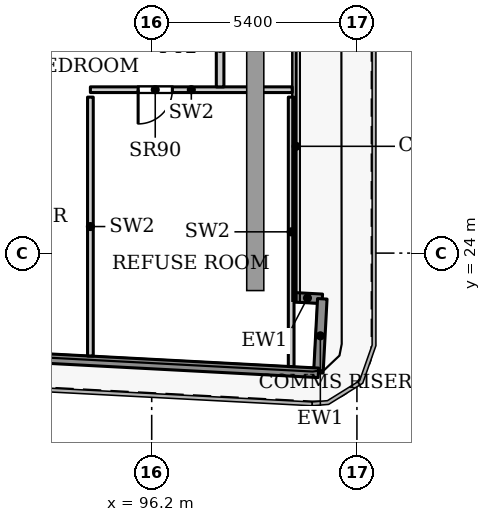
"""IFC4 building model, lengths in metres.
Left out: names, types, materials, properties, quantities, classifications, styles, units other than length and angle.
Written with IfcOpenShell. Run it as: python <this file> out.ifc"""

import sys

from ifc_helpers import new_model, si_unit, direction, frame, frame_2d, origin, place, context, subcontext, project, spatial, rectangle, extrude, source, transform, mapped, element, fill, save


model = new_model("IFC4")
c1 = context("Model", 3, precision=1e-05, world=origin(), true_north=direction((0.0, 1.0)))
c2 = subcontext(c1, "Body", "Model", "MODEL_VIEW")
j1 = project(units=[si_unit("LENGTHUNIT", "METRE"), si_unit("PLANEANGLEUNIT", "RADIAN")], contexts=[c1])
p1 = place(None, origin())
s1 = spatial("IfcSite", under=j1, at=p1, CompositionType="ELEMENT")
p2 = place(p1, origin())
s2 = spatial("IfcBuilding", under=s1, at=p2, CompositionType="ELEMENT")
p3 = place(p2, frame((0.0, 0.0, 140.9)))
s3 = spatial("IfcBuildingStorey", under=s2, at=p3, CompositionType="ELEMENT", Elevation=140.9)
p4 = place(p3, frame((99.907, 22.839, 0.0), z_axis=(0.0, 0.0, 1.0), x_axis=(0.998561284263, -0.053622398031, 0.0)))
e1 = element("IfcWall", 1, at=p4, inside=s3, PredefinedType="SOLIDWALL", context=c2, shape_type="SweptSolid", body=[
    extrude(rectangle(XDim=0.783, YDim=0.25, at=frame_2d((0.392, 0.0))), origin(), (0.0, 0.0, 1.0), 3.75),
])
p5 = place(p3, frame((100.689, 22.797, 0.0), z_axis=(0.0, 0.0, 1.0), x_axis=(-0.052841433274, -0.998602915542, 0.0)))
e2 = element("IfcWall", 2, at=p5, inside=s3, PredefinedType="SOLIDWALL", context=c2, shape_type="SweptSolid", body=[
    extrude(rectangle(XDim=1.95, YDim=0.25, at=frame_2d((0.975, 0.0))), origin(), (0.0, 0.0, 1.0), 3.75),
])
p6 = place(p3, frame((100.586, 20.85, 0.0), z_axis=(0.0, 0.0, 1.0), x_axis=(-0.99861746497, 0.052565755559, 0.0)))
e3 = element("IfcWall", 3, at=p6, inside=s3, PredefinedType="SOLIDWALL", context=c2, shape_type="SweptSolid", body=[
    extrude(rectangle(XDim=66.639, YDim=0.25, at=frame_2d((33.319, 0.0))), origin(), (0.0, 0.0, 1.0), 3.75),
])
p7 = place(p3, frame((94.587, 28.3, 0.0), z_axis=(0.0, 0.0, 1.0), x_axis=(1.0, 0.0, 0.0)))
e4 = element("IfcWall", 4, at=p7, inside=s3, PredefinedType="PARTITIONING", context=c2, shape_type="SweptSolid", body=[
    extrude(rectangle(XDim=5.311, YDim=0.15, at=frame_2d((2.656, 0.0))), origin(), (0.0, 0.0, 1.0), 3.9),
])
p8 = place(p7, frame((1.256, 0.0, 0.0)))
e5 = element("IfcOpeningElement", 5, at=p8, cuts=e4, PredefinedType="OPENING", context=c2, shape_type="SweptSolid", body=[
    extrude(rectangle(XDim=0.9, YDim=2.2, at=frame_2d((0.45, 1.1))), frame((0.0, 0.085, 0.0), z_axis=(0.0, -1.0, 0.0), x_axis=(1.0, 0.0, 0.0)), (0.0, 0.0, 1.0), 0.17),
])
p9 = place(p3, frame((94.587, 21.293, 0.0), z_axis=(0.0, 0.0, 1.0), x_axis=(0.0, 1.0, 0.0)))
e6 = element("IfcWall", 6, at=p9, inside=s3, PredefinedType="PARTITIONING", context=c2, shape_type="SweptSolid", body=[
    extrude(rectangle(XDim=6.812, YDim=0.15, at=frame_2d((3.406, 0.0))), origin(), (0.0, 0.0, 1.0), 3.9),
])
p10 = place(p3, frame((99.87, 21.015, 0.0), z_axis=(0.0, 0.0, 1.0), x_axis=(0.0, 1.0, 0.0)))
e7 = element("IfcWall", 7, at=p10, inside=s3, PredefinedType="PARTITIONING", context=c2, shape_type="SweptSolid", body=[
    extrude(rectangle(XDim=7.09, YDim=0.15, at=frame_2d((3.545, 0.0))), origin(), (0.0, 0.0, 1.0), 3.9),
])
p11 = place(p3, frame((98.0, 28.374, 0.0), z_axis=(0.0, 0.0, 1.0), x_axis=(0.0, 1.0, 0.0)))
e8 = element("IfcWall", 8, at=p11, inside=s3, PredefinedType="PARTITIONING", context=c2, shape_type="SweptSolid", body=[
    extrude(rectangle(XDim=2.026, YDim=0.2, at=frame_2d((1.013, 0.0))), origin(), (0.0, 0.0, 1.0), 3.6),
])
m1 = source(origin(), c2, "Body", "SweptSolid", [
    extrude(rectangle(XDim=0.9, YDim=2.2, at=frame_2d((0.45, 1.1))), frame((0.0, 0.025, 0.0), z_axis=(0.0, -1.0, 0.0), x_axis=(1.0, 0.0, 0.0)), (0.0, 0.0, 1.0), 0.05),
])
p12 = place(p8, origin())
e9 = element("IfcDoor", 9, at=p12, inside=s3, OperationType="SINGLE_SWING_RIGHT", PredefinedType="DOOR", context=c2, shape_type="MappedRepresentation", body=[
    mapped(m1, transform((0.0, 0.0, 0.0), x_axis=(1.0, 0.0, 0.0), y_axis=(0.0, 1.0, 0.0), z_axis=(0.0, 0.0, 1.0), scale=1.0)),
])
fill(e5, e9)
save(model, sys.argv[1])
